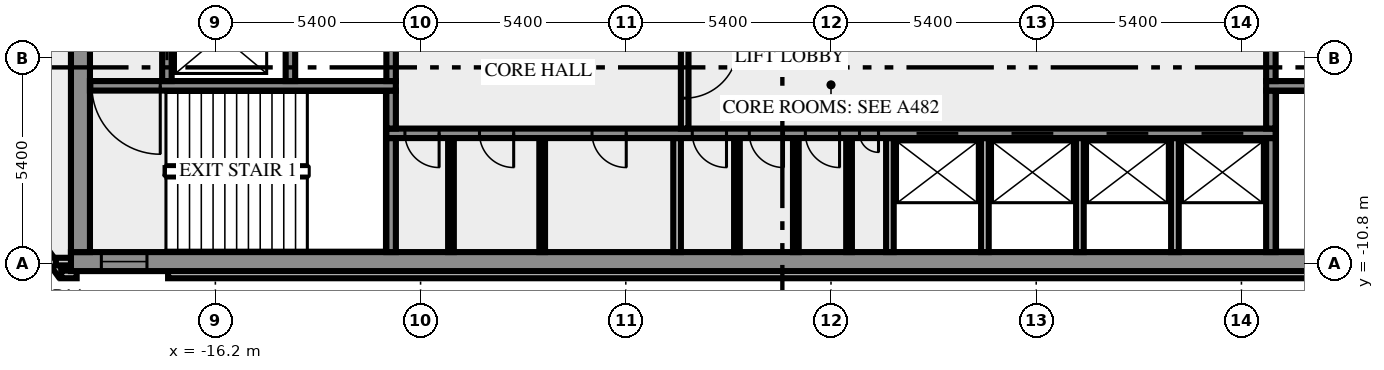
"""IFC4 building model, lengths in metres.
Left out: names, types, materials, properties, quantities, classifications, styles, units other than length and angle.
Written with IfcOpenShell. Run it as: python <this file> out.ifc"""

import sys

from ifc_helpers import new_model, si_unit, direction, frame, frame_2d, origin, place, context, subcontext, project, spatial, rectangle, extrude, element, fill, save


model = new_model("IFC4")
c1 = context("Model", 3, precision=1e-05, world=origin(), true_north=direction((0.0, 1.0)))
c2 = subcontext(c1, "Body", "Model", "MODEL_VIEW")
j1 = project(units=[si_unit("LENGTHUNIT", "METRE"), si_unit("PLANEANGLEUNIT", "RADIAN")], contexts=[c1])
p1 = place(None, origin())
s1 = spatial("IfcSite", under=j1, at=p1, CompositionType="ELEMENT")
p2 = place(p1, origin())
s2 = spatial("IfcBuilding", under=s1, at=p2, CompositionType="ELEMENT")
p3 = place(p2, frame((0.0, 0.0, 160.0)))
s3 = spatial("IfcBuildingStorey", under=s2, at=p3, CompositionType="ELEMENT", Elevation=160.0)
p4 = place(p3, frame((-21.833, -8.909, 0.0), z_axis=(0.0, 0.0, 1.0), x_axis=(0.587766567315, -0.809030569476, 0.0)))
e1 = element("IfcWall", 1, at=p4, inside=s3, PredefinedType="SOLIDWALL", context=c2, shape_type="SweptSolid", body=[
    extrude(rectangle(XDim=2.688, YDim=0.2, at=frame_2d((1.344, 0.0))), origin(), (0.0, 0.0, 1.0), 3.65),
])
p5 = place(p3, frame((-20.256, -11.088, 0.0), z_axis=(0.0, 0.0, 1.0), x_axis=(1.0, 0.0, 0.0)))
e2 = element("IfcWall", 2, at=p5, inside=s3, PredefinedType="SOLIDWALL", context=c2, shape_type="SweptSolid", body=[
    extrude(rectangle(XDim=0.406, YDim=0.2, at=frame_2d((0.203, 0.0))), origin(), (0.0, 0.0, 1.0), 3.65),
])
p6 = place(p3, frame((-17.444, -11.088, 0.0), z_axis=(0.0, 0.0, 1.0), x_axis=(1.0, 0.0, 0.0)))
e3 = element("IfcWall", 3, at=p6, inside=s3, PredefinedType="SOLIDWALL", context=c2, shape_type="SweptSolid", body=[
    extrude(rectangle(XDim=34.888, YDim=0.2, at=frame_2d((17.444, 0.0))), origin(), (0.0, 0.0, 1.0), 3.65),
])
p7 = place(p3, frame((-19.98, -10.75, 0.0), z_axis=(0.0, 0.0, 1.0), x_axis=(-1.0, 0.0, 0.0)))
e4 = element("IfcWall", 4, at=p7, inside=s3, PredefinedType="SOLIDWALL", context=c2, shape_type="SweptSolid", body=[
    extrude(rectangle(XDim=0.417, YDim=0.2, at=frame_2d((0.208, 0.0))), origin(), (0.0, 0.0, 1.0), 3.65),
])
p8 = place(p3, frame((-20.0, -10.75, 0.0), z_axis=(0.0, 0.0, 1.0), x_axis=(1.0, 0.0, 0.0)))
e5 = element("IfcWall", 5, at=p8, inside=s3, PredefinedType="SHEAR", context=c2, shape_type="SweptSolid", body=[
    extrude(rectangle(XDim=40.0, YDim=0.5, at=frame_2d((20.0, 0.0))), origin(), (0.0, 0.0, 1.0), 3.65),
])
p9 = place(p8, frame((0.8, 0.0, 1.0)))
e6 = element("IfcOpeningElement", 6, at=p9, cuts=e5, PredefinedType="OPENING", context=c2, shape_type="SweptSolid", body=[
    extrude(rectangle(XDim=1.2, YDim=1.2, at=frame_2d((0.6, 0.6))), frame((0.0, 0.26, 0.0), z_axis=(0.0, -1.0, 0.0), x_axis=(1.0, 0.0, 0.0)), (0.0, 0.0, 1.0), 0.52),
])
p10 = place(p8, frame((38.0, 0.0, 1.0)))
e7 = element("IfcOpeningElement", 7, at=p10, cuts=e5, PredefinedType="OPENING", context=c2, shape_type="SweptSolid", body=[
    extrude(rectangle(XDim=1.2, YDim=1.2, at=frame_2d((0.6, 0.6))), frame((0.0, 0.26, 0.0), z_axis=(0.0, -1.0, 0.0), x_axis=(1.0, 0.0, 0.0)), (0.0, 0.0, 1.0), 0.52),
])
p11 = place(p3, frame((-19.75, -10.5, 0.0), z_axis=(0.0, 0.0, 1.0), x_axis=(0.0, 1.0, 0.0)))
e8 = element("IfcWall", 8, at=p11, inside=s3, PredefinedType="SHEAR", context=c2, shape_type="SweptSolid", body=[
    extrude(rectangle(XDim=8.8, YDim=0.5, at=frame_2d((4.4, 0.0))), origin(), (0.0, 0.0, 1.0), 3.65),
])
p12 = place(p3, frame((-11.575, -10.5, 0.0), z_axis=(0.0, 0.0, 1.0), x_axis=(0.0, 1.0, 0.0)))
e9 = element("IfcWall", 9, at=p12, inside=s3, PredefinedType="SHEAR", context=c2, shape_type="SweptSolid", body=[
    extrude(rectangle(XDim=3.0, YDim=0.25, at=frame_2d((1.5, 0.0))), origin(), (0.0, 0.0, 1.0), 3.65),
])
for number, where, z_axis, x_axis in (
    (10, (-10.0, -10.5, 0.0), (0.0, 0.0, 1.0), (0.0, 1.0, 0.0)),
    (11, (-7.6, -10.5, 0.0), (0.0, 0.0, 1.0), (0.0, 1.0, 0.0)),
):
    element("IfcWall", number, at=place(p3, frame(where, z_axis=z_axis, x_axis=x_axis)), inside=s3, PredefinedType="PARTITIONING", context=c2, shape_type="SweptSolid", body=[
        extrude(rectangle(XDim=3.0, YDim=0.15, at=frame_2d((1.5, 0.0))), origin(), (0.0, 0.0, 1.0), 3.65),
    ])
p13 = place(p3, frame((-4.05, -10.5, 0.0), z_axis=(0.0, 0.0, 1.0), x_axis=(0.0, 1.0, 0.0)))
e12 = element("IfcWall", 12, at=p13, inside=s3, PredefinedType="SOLIDWALL", context=c2, shape_type="SweptSolid", body=[
    extrude(rectangle(XDim=3.0, YDim=0.2, at=frame_2d((1.5, 0.0))), origin(), (0.0, 0.0, 1.0), 3.65),
])
for number, where, z_axis, x_axis in (
    (13, (-2.475, -10.5, 0.0), (0.0, 0.0, 1.0), (0.0, 1.0, 0.0)),
    (14, (-0.925, -10.5, 0.0), (0.0, 0.0, 1.0), (0.0, 1.0, 0.0)),
    (15, (0.475, -10.5, 0.0), (0.0, 0.0, 1.0), (0.0, 1.0, 0.0)),
):
    element("IfcWall", number, at=place(p3, frame(where, z_axis=z_axis, x_axis=x_axis)), inside=s3, PredefinedType="PARTITIONING", context=c2, shape_type="SweptSolid", body=[
        extrude(rectangle(XDim=3.0, YDim=0.15, at=frame_2d((1.5, 0.0))), origin(), (0.0, 0.0, 1.0), 3.65),
    ])
for number, where, z_axis, x_axis in (
    (16, (1.55, -10.5, 0.0), (0.0, 0.0, 1.0), (0.0, 1.0, 0.0)),
    (17, (4.05, -10.5, 0.0), (0.0, 0.0, 1.0), (0.0, 1.0, 0.0)),
    (18, (6.55, -10.5, 0.0), (0.0, 0.0, 1.0), (0.0, 1.0, 0.0)),
    (19, (9.05, -10.5, 0.0), (0.0, 0.0, 1.0), (0.0, 1.0, 0.0)),
):
    element("IfcWall", number, at=place(p3, frame(where, z_axis=z_axis, x_axis=x_axis)), inside=s3, PredefinedType="SOLIDWALL", context=c2, shape_type="SweptSolid", body=[
        extrude(rectangle(XDim=3.0, YDim=0.2, at=frame_2d((1.5, 0.0))), origin(), (0.0, 0.0, 1.0), 3.65),
    ])
p14 = place(p3, frame((11.575, -10.5, 0.0), z_axis=(0.0, 0.0, 1.0), x_axis=(0.0, 1.0, 0.0)))
e20 = element("IfcWall", 20, at=p14, inside=s3, PredefinedType="SHEAR", context=c2, shape_type="SweptSolid", body=[
    extrude(rectangle(XDim=3.0, YDim=0.25, at=frame_2d((1.5, 0.0))), origin(), (0.0, 0.0, 1.0), 3.65),
])
p15 = place(p3, frame((11.7, -7.375, 0.0), z_axis=(0.0, 0.0, 1.0), x_axis=(-1.0, 0.0, 0.0)))
e21 = element("IfcWall", 21, at=p15, inside=s3, PredefinedType="SHEAR", context=c2, shape_type="SweptSolid", body=[
    extrude(rectangle(XDim=23.4, YDim=0.25, at=frame_2d((11.7, 0.0))), origin(), (0.0, 0.0, 1.0), 3.65),
])
p16 = place(p15, frame((22.012, 0.0, 0.0)))
e22 = element("IfcOpeningElement", 22, at=p16, cuts=e21, PredefinedType="OPENING", context=c2, shape_type="SweptSolid", body=[
    extrude(rectangle(XDim=0.9, YDim=2.1, at=frame_2d((0.45, 1.05))), frame((0.0, 0.135, 0.0), z_axis=(0.0, -1.0, 0.0), x_axis=(1.0, 0.0, 0.0)), (0.0, 0.0, 1.0), 0.27),
])
p17 = place(p15, frame((20.05, 0.0, 0.0)))
e23 = element("IfcOpeningElement", 23, at=p17, cuts=e21, PredefinedType="OPENING", context=c2, shape_type="SweptSolid", body=[
    extrude(rectangle(XDim=0.9, YDim=2.1, at=frame_2d((0.45, 1.05))), frame((0.0, 0.135, 0.0), z_axis=(0.0, -1.0, 0.0), x_axis=(1.0, 0.0, 0.0)), (0.0, 0.0, 1.0), 0.27),
])
p18 = place(p15, frame((17.088, 0.0, 0.0)))
e24 = element("IfcOpeningElement", 24, at=p18, cuts=e21, PredefinedType="OPENING", context=c2, shape_type="SweptSolid", body=[
    extrude(rectangle(XDim=0.9, YDim=2.1, at=frame_2d((0.45, 1.05))), frame((0.0, 0.135, 0.0), z_axis=(0.0, -1.0, 0.0), x_axis=(1.0, 0.0, 0.0)), (0.0, 0.0, 1.0), 0.27),
])
p19 = place(p15, frame((14.45, 0.0, 0.0)))
e25 = element("IfcOpeningElement", 25, at=p19, cuts=e21, PredefinedType="OPENING", context=c2, shape_type="SweptSolid", body=[
    extrude(rectangle(XDim=0.9, YDim=2.1, at=frame_2d((0.45, 1.05))), frame((0.0, 0.135, 0.0), z_axis=(0.0, -1.0, 0.0), x_axis=(1.0, 0.0, 0.0)), (0.0, 0.0, 1.0), 0.27),
])
p20 = place(p15, frame((12.95, 0.0, 0.0)))
e26 = element("IfcOpeningElement", 26, at=p20, cuts=e21, PredefinedType="OPENING", context=c2, shape_type="SweptSolid", body=[
    extrude(rectangle(XDim=0.9, YDim=2.1, at=frame_2d((0.45, 1.05))), frame((0.0, 0.135, 0.0), z_axis=(0.0, -1.0, 0.0), x_axis=(1.0, 0.0, 0.0)), (0.0, 0.0, 1.0), 0.27),
])
p21 = place(p15, frame((11.475, 0.0, 0.0)))
e27 = element("IfcOpeningElement", 27, at=p21, cuts=e21, PredefinedType="OPENING", context=c2, shape_type="SweptSolid", body=[
    extrude(rectangle(XDim=0.9, YDim=2.1, at=frame_2d((0.45, 1.05))), frame((0.0, 0.135, 0.0), z_axis=(0.0, -1.0, 0.0), x_axis=(1.0, 0.0, 0.0)), (0.0, 0.0, 1.0), 0.27),
])
p22 = place(p15, frame((10.45, 0.0, 0.0)))
e28 = element("IfcOpeningElement", 28, at=p22, cuts=e21, PredefinedType="OPENING", context=c2, shape_type="SweptSolid", body=[
    extrude(rectangle(XDim=0.5, YDim=2.1, at=frame_2d((0.25, 1.05))), frame((0.0, 0.135, 0.0), z_axis=(0.0, -1.0, 0.0), x_axis=(1.0, 0.0, 0.0)), (0.0, 0.0, 1.0), 0.27),
])
p23 = place(p15, frame((8.35, 0.0, 0.0)))
e29 = element("IfcOpeningElement", 29, at=p23, cuts=e21, PredefinedType="OPENING", context=c2, shape_type="SweptSolid", body=[
    extrude(rectangle(XDim=1.1, YDim=2.1, at=frame_2d((0.55, 1.05))), frame((0.0, 0.135, 0.0), z_axis=(0.0, -1.0, 0.0), x_axis=(1.0, 0.0, 0.0)), (0.0, 0.0, 1.0), 0.27),
])
p24 = place(p15, frame((5.85, 0.0, 0.0)))
e30 = element("IfcOpeningElement", 30, at=p24, cuts=e21, PredefinedType="OPENING", context=c2, shape_type="SweptSolid", body=[
    extrude(rectangle(XDim=1.1, YDim=2.1, at=frame_2d((0.55, 1.05))), frame((0.0, 0.135, 0.0), z_axis=(0.0, -1.0, 0.0), x_axis=(1.0, 0.0, 0.0)), (0.0, 0.0, 1.0), 0.27),
])
p25 = place(p15, frame((3.35, 0.0, 0.0)))
e31 = element("IfcOpeningElement", 31, at=p25, cuts=e21, PredefinedType="OPENING", context=c2, shape_type="SweptSolid", body=[
    extrude(rectangle(XDim=1.1, YDim=2.1, at=frame_2d((0.55, 1.05))), frame((0.0, 0.135, 0.0), z_axis=(0.0, -1.0, 0.0), x_axis=(1.0, 0.0, 0.0)), (0.0, 0.0, 1.0), 0.27),
])
p26 = place(p15, frame((0.85, 0.0, 0.0)))
e32 = element("IfcOpeningElement", 32, at=p26, cuts=e21, PredefinedType="OPENING", context=c2, shape_type="SweptSolid", body=[
    extrude(rectangle(XDim=1.1, YDim=2.1, at=frame_2d((0.55, 1.05))), frame((0.0, 0.135, 0.0), z_axis=(0.0, -1.0, 0.0), x_axis=(1.0, 0.0, 0.0)), (0.0, 0.0, 1.0), 0.27),
])
p27 = place(p3, frame((-11.575, -7.25, 0.0), z_axis=(0.0, 0.0, 1.0), x_axis=(0.0, 1.0, 0.0)))
e33 = element("IfcWall", 33, at=p27, inside=s3, PredefinedType="SHEAR", context=c2, shape_type="SweptSolid", body=[
    extrude(rectangle(XDim=1.0, YDim=0.25, at=frame_2d((0.5, 0.0))), origin(), (0.0, 0.0, 1.0), 3.65),
])
p28 = place(p3, frame((-3.85, -4.25, 0.0), z_axis=(0.0, 0.0, 1.0), x_axis=(0.0, -1.0, 0.0)))
e34 = element("IfcWall", 34, at=p28, inside=s3, PredefinedType="SOLIDWALL", context=c2, shape_type="SweptSolid", body=[
    extrude(rectangle(XDim=3.0, YDim=0.2, at=frame_2d((1.5, 0.0))), origin(), (0.0, 0.0, 1.0), 3.65),
])
p29 = place(p28, frame((0.8, 0.0, 0.0)))
e35 = element("IfcOpeningElement", 35, at=p29, cuts=e34, PredefinedType="OPENING", context=c2, shape_type="SweptSolid", body=[
    extrude(rectangle(XDim=1.4, YDim=2.1, at=frame_2d((0.7, 1.05))), frame((0.0, 0.11, 0.0), z_axis=(0.0, -1.0, 0.0), x_axis=(1.0, 0.0, 0.0)), (0.0, 0.0, 1.0), 0.22),
])
p30 = place(p3, frame((11.575, -7.25, 0.0), z_axis=(0.0, 0.0, 1.0), x_axis=(0.0, 1.0, 0.0)))
e36 = element("IfcWall", 36, at=p30, inside=s3, PredefinedType="SHEAR", context=c2, shape_type="SweptSolid", body=[
    extrude(rectangle(XDim=1.0, YDim=0.25, at=frame_2d((0.5, 0.0))), origin(), (0.0, 0.0, 1.0), 3.65),
])
p31 = place(p3, frame((-11.45, -6.125, 0.0), z_axis=(0.0, 0.0, 1.0), x_axis=(-1.0, 0.0, 0.0)))
e37 = element("IfcWall", 37, at=p31, inside=s3, PredefinedType="SHEAR", context=c2, shape_type="SweptSolid", body=[
    extrude(rectangle(XDim=8.05, YDim=0.25, at=frame_2d((4.025, 0.0))), origin(), (0.0, 0.0, 1.0), 3.65),
])
p32 = place(p31, frame((6.2, 0.0, 0.0)))
e38 = element("IfcOpeningElement", 38, at=p32, cuts=e37, PredefinedType="OPENING", context=c2, shape_type="SweptSolid", body=[
    extrude(rectangle(XDim=1.8, YDim=2.1, at=frame_2d((0.9, 1.05))), frame((0.0, 0.135, 0.0), z_axis=(0.0, -1.0, 0.0), x_axis=(1.0, 0.0, 0.0)), (0.0, 0.0, 1.0), 0.27),
])
p33 = place(p3, frame((19.5, -6.125, 0.0), z_axis=(0.0, 0.0, 1.0), x_axis=(-1.0, 0.0, 0.0)))
e39 = element("IfcWall", 39, at=p33, inside=s3, PredefinedType="SHEAR", context=c2, shape_type="SweptSolid", body=[
    extrude(rectangle(XDim=8.05, YDim=0.25, at=frame_2d((4.025, 0.0))), origin(), (0.0, 0.0, 1.0), 3.65),
])
p34 = place(p33, frame((0.05, 0.0, 0.0)))
e40 = element("IfcOpeningElement", 40, at=p34, cuts=e39, PredefinedType="OPENING", context=c2, shape_type="SweptSolid", body=[
    extrude(rectangle(XDim=1.8, YDim=2.1, at=frame_2d((0.9, 1.05))), frame((0.0, 0.135, 0.0), z_axis=(0.0, -1.0, 0.0), x_axis=(1.0, 0.0, 0.0)), (0.0, 0.0, 1.0), 0.27),
])
p35 = place(p3, frame((-17.475, -6.0, 0.0), z_axis=(0.0, 0.0, 1.0), x_axis=(0.0, 1.0, 0.0)))
e41 = element("IfcWall", 41, at=p35, inside=s3, PredefinedType="SHEAR", context=c2, shape_type="SweptSolid", body=[
    extrude(rectangle(XDim=4.3, YDim=0.25, at=frame_2d((2.15, 0.0))), origin(), (0.0, 0.0, 1.0), 3.65),
])
p36 = place(p35, frame((0.55, 0.0, 0.0)))
e42 = element("IfcOpeningElement", 42, at=p36, cuts=e41, PredefinedType="OPENING", context=c2, shape_type="SweptSolid", body=[
    extrude(rectangle(XDim=1.3, YDim=2.1, at=frame_2d((0.65, 1.05))), frame((0.0, 0.135, 0.0), z_axis=(0.0, -1.0, 0.0), x_axis=(1.0, 0.0, 0.0)), (0.0, 0.0, 1.0), 0.27),
])
p37 = place(p3, frame((-14.225, -6.0, 0.0), z_axis=(0.0, 0.0, 1.0), x_axis=(0.0, 1.0, 0.0)))
e43 = element("IfcWall", 43, at=p37, inside=s3, PredefinedType="SHEAR", context=c2, shape_type="SweptSolid", body=[
    extrude(rectangle(XDim=4.3, YDim=0.25, at=frame_2d((2.15, 0.0))), origin(), (0.0, 0.0, 1.0), 3.65),
])
for number, where, z_axis, x_axis in (
    (44, (-11.575, -6.0, 0.0), (0.0, 0.0, 1.0), (0.0, 1.0, 0.0)),
    (45, (11.575, -6.0, 0.0), (0.0, 0.0, 1.0), (0.0, 1.0, 0.0)),
):
    element("IfcWall", number, at=place(p3, frame(where, z_axis=z_axis, x_axis=x_axis)), inside=s3, PredefinedType="SHEAR", context=c2, shape_type="SweptSolid", body=[
        extrude(rectangle(XDim=1.75, YDim=0.25, at=frame_2d((0.875, 0.0))), origin(), (0.0, 0.0, 1.0), 3.65),
    ])
p38 = place(p9, origin())
e46 = element("IfcWindow", 46, at=p38, inside=s3, PartitioningType="SINGLE_PANEL", PredefinedType="WINDOW", context=c2, shape_type="SweptSolid", body=[
    extrude(rectangle(XDim=1.2, YDim=1.2, at=frame_2d((0.6, 0.6))), frame((0.0, 0.03, 0.0), z_axis=(0.0, -1.0, 0.0), x_axis=(1.0, 0.0, 0.0)), (0.0, 0.0, 1.0), 0.06),
])
fill(e6, e46)
p39 = place(p16, origin())
e47 = element("IfcDoor", 47, at=p39, inside=s3, OperationType="SINGLE_SWING_RIGHT", PredefinedType="DOOR", context=c2, shape_type="SweptSolid", body=[
    extrude(rectangle(XDim=0.9, YDim=2.1, at=frame_2d((0.45, 1.05))), frame((0.0, 0.025, 0.0), z_axis=(0.0, -1.0, 0.0), x_axis=(1.0, 0.0, 0.0)), (0.0, 0.0, 1.0), 0.05),
])
fill(e22, e47)
p40 = place(p17, origin())
e48 = element("IfcDoor", 48, at=p40, inside=s3, OperationType="SINGLE_SWING_RIGHT", PredefinedType="DOOR", context=c2, shape_type="SweptSolid", body=[
    extrude(rectangle(XDim=0.9, YDim=2.1, at=frame_2d((0.45, 1.05))), frame((0.0, 0.025, 0.0), z_axis=(0.0, -1.0, 0.0), x_axis=(1.0, 0.0, 0.0)), (0.0, 0.0, 1.0), 0.05),
])
fill(e23, e48)
p41 = place(p18, origin())
e49 = element("IfcDoor", 49, at=p41, inside=s3, OperationType="SINGLE_SWING_RIGHT", PredefinedType="DOOR", context=c2, shape_type="SweptSolid", body=[
    extrude(rectangle(XDim=0.9, YDim=2.1, at=frame_2d((0.45, 1.05))), frame((0.0, 0.025, 0.0), z_axis=(0.0, -1.0, 0.0), x_axis=(1.0, 0.0, 0.0)), (0.0, 0.0, 1.0), 0.05),
])
fill(e24, e49)
p42 = place(p19, origin())
e50 = element("IfcDoor", 50, at=p42, inside=s3, OperationType="SINGLE_SWING_RIGHT", PredefinedType="DOOR", context=c2, shape_type="SweptSolid", body=[
    extrude(rectangle(XDim=0.9, YDim=2.1, at=frame_2d((0.45, 1.05))), frame((0.0, 0.025, 0.0), z_axis=(0.0, -1.0, 0.0), x_axis=(1.0, 0.0, 0.0)), (0.0, 0.0, 1.0), 0.05),
])
fill(e25, e50)
p43 = place(p20, origin())
e51 = element("IfcDoor", 51, at=p43, inside=s3, OperationType="SINGLE_SWING_RIGHT", PredefinedType="DOOR", context=c2, shape_type="SweptSolid", body=[
    extrude(rectangle(XDim=0.9, YDim=2.1, at=frame_2d((0.45, 1.05))), frame((0.0, 0.025, 0.0), z_axis=(0.0, -1.0, 0.0), x_axis=(1.0, 0.0, 0.0)), (0.0, 0.0, 1.0), 0.05),
])
fill(e26, e51)
p44 = place(p21, origin())
e52 = element("IfcDoor", 52, at=p44, inside=s3, OperationType="SINGLE_SWING_RIGHT", PredefinedType="DOOR", context=c2, shape_type="SweptSolid", body=[
    extrude(rectangle(XDim=0.9, YDim=2.1, at=frame_2d((0.45, 1.05))), frame((0.0, 0.025, 0.0), z_axis=(0.0, -1.0, 0.0), x_axis=(1.0, 0.0, 0.0)), (0.0, 0.0, 1.0), 0.05),
])
fill(e27, e52)
p45 = place(p22, origin())
e53 = element("IfcDoor", 53, at=p45, inside=s3, OperationType="SINGLE_SWING_LEFT", PredefinedType="DOOR", context=c2, shape_type="SweptSolid", body=[
    extrude(rectangle(XDim=0.5, YDim=2.1, at=frame_2d((0.25, 1.05))), frame((0.0, 0.025, 0.0), z_axis=(0.0, -1.0, 0.0), x_axis=(1.0, 0.0, 0.0)), (0.0, 0.0, 1.0), 0.05),
])
fill(e28, e53)
p46 = place(p23, origin())
e54 = element("IfcDoor", 54, at=p46, inside=s3, OperationType="DOUBLE_DOOR_SLIDING", PredefinedType="DOOR", context=c2, shape_type="SweptSolid", body=[
    extrude(rectangle(XDim=1.1, YDim=2.1, at=frame_2d((0.55, 1.05))), frame((0.0, 0.025, 0.0), z_axis=(0.0, -1.0, 0.0), x_axis=(1.0, 0.0, 0.0)), (0.0, 0.0, 1.0), 0.05),
])
fill(e29, e54)
p47 = place(p24, origin())
e55 = element("IfcDoor", 55, at=p47, inside=s3, OperationType="DOUBLE_DOOR_SLIDING", PredefinedType="DOOR", context=c2, shape_type="SweptSolid", body=[
    extrude(rectangle(XDim=1.1, YDim=2.1, at=frame_2d((0.55, 1.05))), frame((0.0, 0.025, 0.0), z_axis=(0.0, -1.0, 0.0), x_axis=(1.0, 0.0, 0.0)), (0.0, 0.0, 1.0), 0.05),
])
fill(e30, e55)
p48 = place(p25, origin())
e56 = element("IfcDoor", 56, at=p48, inside=s3, OperationType="DOUBLE_DOOR_SLIDING", PredefinedType="DOOR", context=c2, shape_type="SweptSolid", body=[
    extrude(rectangle(XDim=1.1, YDim=2.1, at=frame_2d((0.55, 1.05))), frame((0.0, 0.025, 0.0), z_axis=(0.0, -1.0, 0.0), x_axis=(1.0, 0.0, 0.0)), (0.0, 0.0, 1.0), 0.05),
])
fill(e31, e56)
p49 = place(p26, origin())
e57 = element("IfcDoor", 57, at=p49, inside=s3, OperationType="DOUBLE_DOOR_SLIDING", PredefinedType="DOOR", context=c2, shape_type="SweptSolid", body=[
    extrude(rectangle(XDim=1.1, YDim=2.1, at=frame_2d((0.55, 1.05))), frame((0.0, 0.025, 0.0), z_axis=(0.0, -1.0, 0.0), x_axis=(1.0, 0.0, 0.0)), (0.0, 0.0, 1.0), 0.05),
])
fill(e32, e57)
p50 = place(p29, origin())
e58 = element("IfcDoor", 58, at=p50, inside=s3, OperationType="DOUBLE_DOOR_SINGLE_SWING", PredefinedType="DOOR", context=c2, shape_type="SweptSolid", body=[
    extrude(rectangle(XDim=1.4, YDim=2.1, at=frame_2d((0.7, 1.05))), frame((0.0, 0.025, 0.0), z_axis=(0.0, -1.0, 0.0), x_axis=(1.0, 0.0, 0.0)), (0.0, 0.0, 1.0), 0.05),
])
fill(e35, e58)
p51 = place(p32, origin())
e59 = element("IfcDoor", 59, at=p51, inside=s3, OperationType="DOUBLE_DOOR_SINGLE_SWING", PredefinedType="DOOR", context=c2, shape_type="SweptSolid", body=[
    extrude(rectangle(XDim=1.8, YDim=2.1, at=frame_2d((0.9, 1.05))), frame((0.0, 0.025, 0.0), z_axis=(0.0, -1.0, 0.0), x_axis=(1.0, 0.0, 0.0)), (0.0, 0.0, 1.0), 0.05),
])
fill(e38, e59)
p52 = place(p36, origin())
e60 = element("IfcDoor", 60, at=p52, inside=s3, OperationType="DOUBLE_DOOR_SLIDING", PredefinedType="DOOR", context=c2, shape_type="SweptSolid", body=[
    extrude(rectangle(XDim=1.3, YDim=2.1, at=frame_2d((0.65, 1.05))), frame((0.0, 0.025, 0.0), z_axis=(0.0, -1.0, 0.0), x_axis=(1.0, 0.0, 0.0)), (0.0, 0.0, 1.0), 0.05),
])
fill(e42, e60)
save(model, sys.argv[1])
